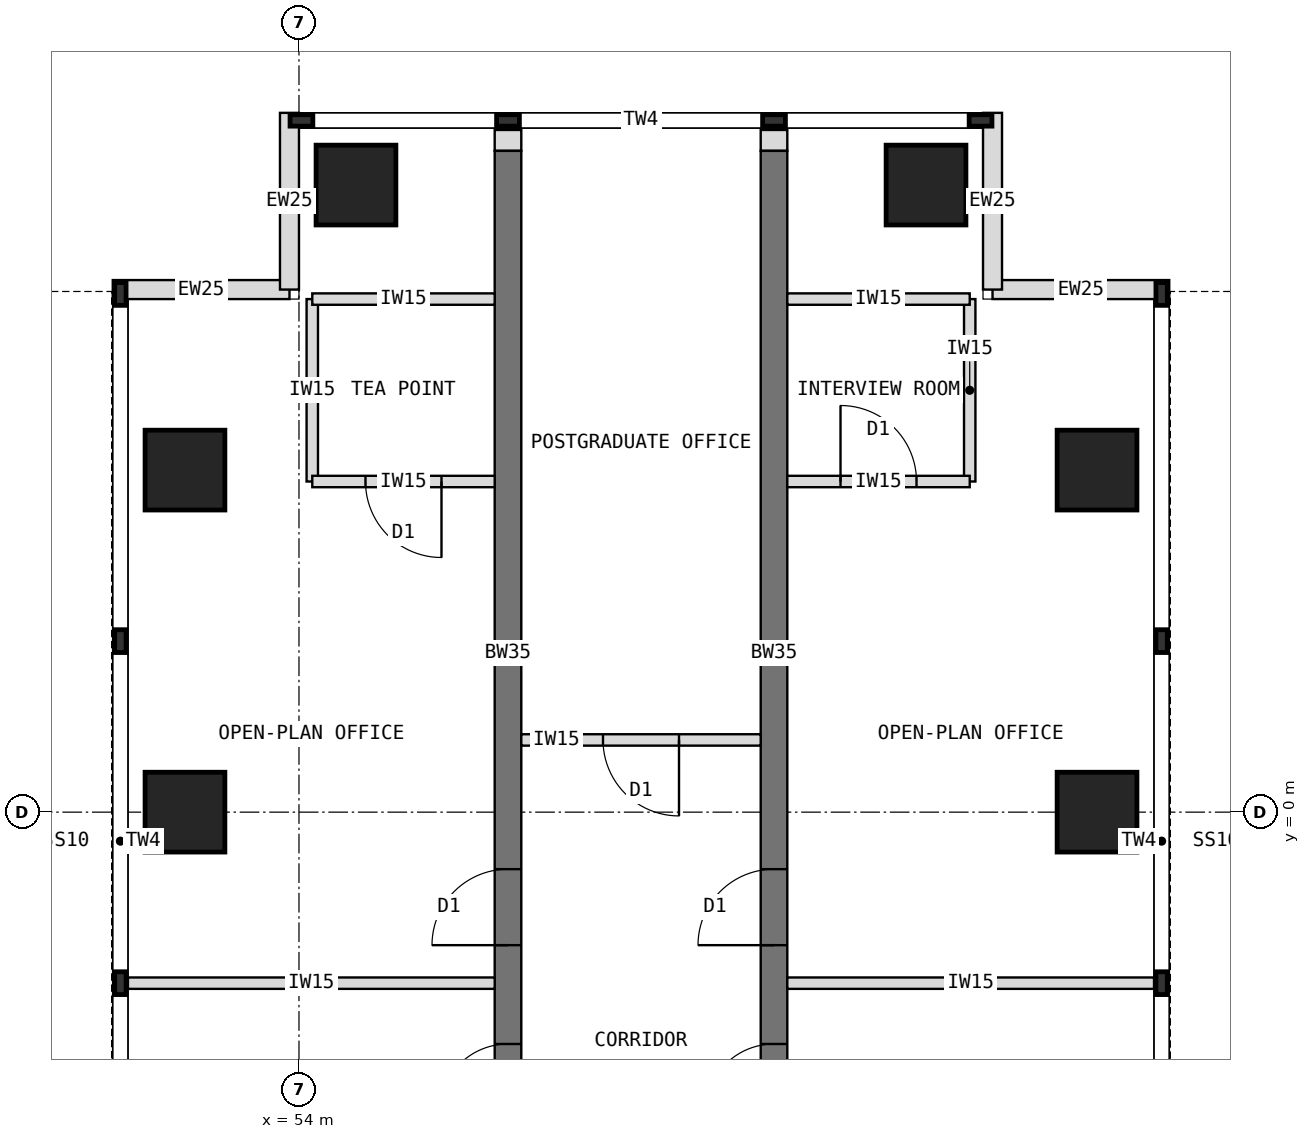
"""IFC4 building model, lengths in metres.
Left out: names, types, materials, properties, quantities, classifications, styles, units other than length and angle.
Written with IfcOpenShell. Run it as: python <this file> out.ifc"""

import sys

from ifc_helpers import new_model, si_unit, direction, frame, frame_2d, origin, origin_2d, place, context, subcontext, project, spatial, rectangle, extrude, element, fill, save


model = new_model("IFC4")
c1 = context("Model", 3, precision=1e-05, world=origin(), true_north=direction((0.0, 1.0)))
c2 = subcontext(c1, "Body", "Model", "MODEL_VIEW")
j1 = project(units=[si_unit("LENGTHUNIT", "METRE"), si_unit("PLANEANGLEUNIT", "RADIAN")], contexts=[c1])
p1 = place(None, origin())
s1 = spatial("IfcSite", under=j1, at=p1, CompositionType="ELEMENT")
p2 = place(p1, origin())
s2 = spatial("IfcBuilding", under=s1, at=p2, CompositionType="ELEMENT")
p3 = place(p2, frame((0.0, 0.0, 247.5)))
s3 = spatial("IfcBuildingStorey", under=s2, at=p3, CompositionType="ELEMENT", Elevation=247.5)
p4 = place(p3, frame((56.75, -4.5, 0.0), z_axis=(0.0, 0.0, 1.0), x_axis=(0.0, 1.0, 0.0)))
e1 = element("IfcWall", 1, at=p4, inside=s3, PredefinedType="SHEAR", context=c2, shape_type="SweptSolid", body=[
    extrude(rectangle(XDim=13.2, YDim=0.35, at=frame_2d((6.6, 0.0))), origin(), (0.0, 0.0, 1.0), 4.0),
])
p5 = place(p4, frame((0.55, 0.0, 0.0)))
e2 = element("IfcOpeningElement", 2, at=p5, cuts=e1, PredefinedType="OPENING", context=c2, shape_type="SweptSolid", body=[
    extrude(rectangle(XDim=0.9, YDim=2.1, at=frame_2d((0.45, 1.05))), frame((0.0, 0.185, 0.0), z_axis=(0.0, -1.0, 0.0), x_axis=(1.0, 0.0, 0.0)), (0.0, 0.0, 1.0), 0.37),
])
p6 = place(p4, frame((2.75, 0.0, 0.0)))
e3 = element("IfcOpeningElement", 3, at=p6, cuts=e1, PredefinedType="OPENING", context=c2, shape_type="SweptSolid", body=[
    extrude(rectangle(XDim=1.0, YDim=2.1, at=frame_2d((0.5, 1.05))), frame((0.0, 0.185, 0.0), z_axis=(0.0, -1.0, 0.0), x_axis=(1.0, 0.0, 0.0)), (0.0, 0.0, 1.0), 0.37),
])
p7 = place(p3, frame((60.25, -4.5, 0.0), z_axis=(0.0, 0.0, 1.0), x_axis=(0.0, 1.0, 0.0)))
e4 = element("IfcWall", 4, at=p7, inside=s3, PredefinedType="SHEAR", context=c2, shape_type="SweptSolid", body=[
    extrude(rectangle(XDim=13.2, YDim=0.35, at=frame_2d((6.6, 0.0))), origin(), (0.0, 0.0, 1.0), 4.0),
])
p8 = place(p7, frame((0.55, 0.0, 0.0)))
e5 = element("IfcOpeningElement", 5, at=p8, cuts=e4, PredefinedType="OPENING", context=c2, shape_type="SweptSolid", body=[
    extrude(rectangle(XDim=0.9, YDim=2.1, at=frame_2d((0.45, 1.05))), frame((0.0, 0.185, 0.0), z_axis=(0.0, -1.0, 0.0), x_axis=(1.0, 0.0, 0.0)), (0.0, 0.0, 1.0), 0.37),
])
p9 = place(p7, frame((2.75, 0.0, 0.0)))
e6 = element("IfcOpeningElement", 6, at=p9, cuts=e4, PredefinedType="OPENING", context=c2, shape_type="SweptSolid", body=[
    extrude(rectangle(XDim=1.0, YDim=2.1, at=frame_2d((0.5, 1.05))), frame((0.0, 0.185, 0.0), z_axis=(0.0, -1.0, 0.0), x_axis=(1.0, 0.0, 0.0)), (0.0, 0.0, 1.0), 0.37),
])
for number, where, z_axis, x_axis in (
    (7, (52.5, 0.0, 0.0), (0.0, 0.0, 1.0), (1.0, 0.0, 0.0)),
    (8, (64.5, 0.0, 0.0), (0.0, 0.0, 1.0), (1.0, 0.0, 0.0)),
    (9, (52.5, 4.5, 0.0), (0.0, 0.0, 1.0), (1.0, 0.0, 0.0)),
    (10, (64.5, 4.5, 0.0), (0.0, 0.0, 1.0), (1.0, 0.0, 0.0)),
    (11, (54.75, 8.25, 0.0), (0.0, 0.0, 1.0), (1.0, 0.0, 0.0)),
    (12, (62.25, 8.25, 0.0), (0.0, 0.0, 1.0), (1.0, 0.0, 0.0)),
):
    element("IfcColumn", number, at=place(p3, frame(where, z_axis=z_axis, x_axis=x_axis)), inside=s3, PredefinedType="COLUMN", context=c2, shape_type="SweptSolid", body=[
        extrude(rectangle(XDim=1.05, YDim=1.05, at=origin_2d()), origin(), (0.0, 0.0, 1.0), 4.0),
    ])
for number, where, z_axis, x_axis in (
    (13, (51.55, 6.875, 0.0), (0.0, 0.0, 1.0), (1.0, 0.0, 0.0)),
    (14, (53.875, 6.875, 0.0), (0.0, 0.0, 1.0), (0.0, 1.0, 0.0)),
    (15, (65.45, 6.875, 0.0), (0.0, 0.0, 1.0), (-1.0, 0.0, 0.0)),
    (16, (63.125, 6.875, 0.0), (0.0, 0.0, 1.0), (0.0, 1.0, 0.0)),
):
    element("IfcWall", number, at=place(p3, frame(where, z_axis=z_axis, x_axis=x_axis)), inside=s3, PredefinedType="STANDARD", context=c2, shape_type="SweptSolid", body=[
        extrude(rectangle(XDim=2.325, YDim=0.25, at=frame_2d((1.163, 0.0))), origin(), (0.0, 0.0, 1.0), 3.8),
    ])
for number, where, z_axis, x_axis in (
    (17, (56.75, 8.7, 0.0), (0.0, 0.0, 1.0), (0.0, 1.0, 0.0)),
    (18, (60.25, 8.7, 0.0), (0.0, 0.0, 1.0), (0.0, 1.0, 0.0)),
):
    element("IfcWall", number, at=place(p3, frame(where, z_axis=z_axis, x_axis=x_axis)), inside=s3, PredefinedType="PARTITIONING", context=c2, shape_type="SweptSolid", body=[
        extrude(rectangle(XDim=0.275, YDim=0.35, at=frame_2d((0.138, 0.0))), origin(), (0.0, 0.0, 1.0), 3.8),
    ])
p10 = place(p3, frame((56.575, -2.25, 0.0), z_axis=(0.0, 0.0, 1.0), x_axis=(-1.0, 0.0, 0.0)))
e19 = element("IfcWall", 19, at=p10, inside=s3, PredefinedType="PARTITIONING", context=c2, shape_type="SweptSolid", body=[
    extrude(rectangle(XDim=4.825, YDim=0.15, at=frame_2d((2.413, 0.0))), origin(), (0.0, 0.0, 1.0), 3.8),
])
p11 = place(p3, frame((54.175, 4.35, 0.0), z_axis=(0.0, 0.0, 1.0), x_axis=(0.0, 1.0, 0.0)))
e20 = element("IfcWall", 20, at=p11, inside=s3, PredefinedType="PARTITIONING", context=c2, shape_type="SweptSolid", body=[
    extrude(rectangle(XDim=2.4, YDim=0.15, at=frame_2d((1.2, 0.0))), origin(), (0.0, 0.0, 1.0), 3.8),
])
p12 = place(p3, frame((56.575, 4.35, 0.0), z_axis=(0.0, 0.0, 1.0), x_axis=(-1.0, 0.0, 0.0)))
e21 = element("IfcWall", 21, at=p12, inside=s3, PredefinedType="PARTITIONING", context=c2, shape_type="SweptSolid", body=[
    extrude(rectangle(XDim=2.4, YDim=0.15, at=frame_2d((1.2, 0.0))), origin(), (0.0, 0.0, 1.0), 3.8),
])
p13 = place(p12, frame((0.7, 0.0, 0.0)))
e22 = element("IfcOpeningElement", 22, at=p13, cuts=e21, PredefinedType="OPENING", context=c2, shape_type="SweptSolid", body=[
    extrude(rectangle(XDim=1.0, YDim=2.1, at=frame_2d((0.5, 1.05))), frame((0.0, 0.085, 0.0), z_axis=(0.0, -1.0, 0.0), x_axis=(1.0, 0.0, 0.0)), (0.0, 0.0, 1.0), 0.17),
])
p14 = place(p3, frame((56.575, 6.75, 0.0), z_axis=(0.0, 0.0, 1.0), x_axis=(-1.0, 0.0, 0.0)))
e23 = element("IfcWall", 23, at=p14, inside=s3, PredefinedType="PARTITIONING", context=c2, shape_type="SweptSolid", body=[
    extrude(rectangle(XDim=2.4, YDim=0.15, at=frame_2d((1.2, 0.0))), origin(), (0.0, 0.0, 1.0), 3.8),
])
p15 = place(p3, frame((60.425, -2.25, 0.0), z_axis=(0.0, 0.0, 1.0), x_axis=(1.0, 0.0, 0.0)))
e24 = element("IfcWall", 24, at=p15, inside=s3, PredefinedType="PARTITIONING", context=c2, shape_type="SweptSolid", body=[
    extrude(rectangle(XDim=4.825, YDim=0.15, at=frame_2d((2.413, 0.0))), origin(), (0.0, 0.0, 1.0), 3.8),
])
p16 = place(p3, frame((62.825, 4.35, 0.0), z_axis=(0.0, 0.0, 1.0), x_axis=(0.0, 1.0, 0.0)))
e25 = element("IfcWall", 25, at=p16, inside=s3, PredefinedType="PARTITIONING", context=c2, shape_type="SweptSolid", body=[
    extrude(rectangle(XDim=2.4, YDim=0.15, at=frame_2d((1.2, 0.0))), origin(), (0.0, 0.0, 1.0), 3.8),
])
p17 = place(p3, frame((60.425, 4.35, 0.0), z_axis=(0.0, 0.0, 1.0), x_axis=(1.0, 0.0, 0.0)))
e26 = element("IfcWall", 26, at=p17, inside=s3, PredefinedType="PARTITIONING", context=c2, shape_type="SweptSolid", body=[
    extrude(rectangle(XDim=2.4, YDim=0.15, at=frame_2d((1.2, 0.0))), origin(), (0.0, 0.0, 1.0), 3.8),
])
p18 = place(p17, frame((0.7, 0.0, 0.0)))
e27 = element("IfcOpeningElement", 27, at=p18, cuts=e26, PredefinedType="OPENING", context=c2, shape_type="SweptSolid", body=[
    extrude(rectangle(XDim=1.0, YDim=2.1, at=frame_2d((0.5, 1.05))), frame((0.0, 0.085, 0.0), z_axis=(0.0, -1.0, 0.0), x_axis=(1.0, 0.0, 0.0)), (0.0, 0.0, 1.0), 0.17),
])
p19 = place(p3, frame((60.425, 6.75, 0.0), z_axis=(0.0, 0.0, 1.0), x_axis=(1.0, 0.0, 0.0)))
e28 = element("IfcWall", 28, at=p19, inside=s3, PredefinedType="PARTITIONING", context=c2, shape_type="SweptSolid", body=[
    extrude(rectangle(XDim=2.4, YDim=0.15, at=frame_2d((1.2, 0.0))), origin(), (0.0, 0.0, 1.0), 3.8),
])
p20 = place(p3, frame((60.075, 0.95, 0.0), z_axis=(0.0, 0.0, 1.0), x_axis=(-1.0, 0.0, 0.0)))
e29 = element("IfcWall", 29, at=p20, inside=s3, PredefinedType="PARTITIONING", context=c2, shape_type="SweptSolid", body=[
    extrude(rectangle(XDim=3.15, YDim=0.15, at=frame_2d((1.575, 0.0))), origin(), (0.0, 0.0, 1.0), 3.8),
])
p21 = place(p20, frame((1.075, 0.0, 0.0)))
e30 = element("IfcOpeningElement", 30, at=p21, cuts=e29, PredefinedType="OPENING", context=c2, shape_type="SweptSolid", body=[
    extrude(rectangle(XDim=1.0, YDim=2.1, at=frame_2d((0.5, 1.05))), frame((0.0, 0.085, 0.0), z_axis=(0.0, -1.0, 0.0), x_axis=(1.0, 0.0, 0.0)), (0.0, 0.0, 1.0), 0.17),
])
p22 = place(p13, origin())
e31 = element("IfcDoor", 31, at=p22, inside=s3, OperationType="SINGLE_SWING_LEFT", PredefinedType="DOOR", context=c2, shape_type="SweptSolid", body=[
    extrude(rectangle(XDim=1.0, YDim=2.1, at=frame_2d((0.5, 1.05))), frame((0.0, 0.025, 0.0), z_axis=(0.0, -1.0, 0.0), x_axis=(1.0, 0.0, 0.0)), (0.0, 0.0, 1.0), 0.05),
])
fill(e22, e31)
p23 = place(p18, origin())
e32 = element("IfcDoor", 32, at=p23, inside=s3, OperationType="SINGLE_SWING_LEFT", PredefinedType="DOOR", context=c2, shape_type="SweptSolid", body=[
    extrude(rectangle(XDim=1.0, YDim=2.1, at=frame_2d((0.5, 1.05))), frame((0.0, 0.025, 0.0), z_axis=(0.0, -1.0, 0.0), x_axis=(1.0, 0.0, 0.0)), (0.0, 0.0, 1.0), 0.05),
])
fill(e27, e32)
p24 = place(p21, origin())
e33 = element("IfcDoor", 33, at=p24, inside=s3, OperationType="SINGLE_SWING_LEFT", PredefinedType="DOOR", context=c2, shape_type="SweptSolid", body=[
    extrude(rectangle(XDim=1.0, YDim=2.1, at=frame_2d((0.5, 1.05))), frame((0.0, 0.025, 0.0), z_axis=(0.0, -1.0, 0.0), x_axis=(1.0, 0.0, 0.0)), (0.0, 0.0, 1.0), 0.05),
])
fill(e30, e33)
p25 = place(p5, origin())
e34 = element("IfcDoor", 34, at=p25, inside=s3, OperationType="SINGLE_SWING_LEFT", PredefinedType="DOOR", context=c2, shape_type="SweptSolid", body=[
    extrude(rectangle(XDim=0.9, YDim=2.1, at=frame_2d((0.45, 1.05))), frame((0.0, 0.025, 0.0), z_axis=(0.0, -1.0, 0.0), x_axis=(1.0, 0.0, 0.0)), (0.0, 0.0, 1.0), 0.05),
])
fill(e2, e34)
p26 = place(p6, origin())
e35 = element("IfcDoor", 35, at=p26, inside=s3, OperationType="SINGLE_SWING_LEFT", PredefinedType="DOOR", context=c2, shape_type="SweptSolid", body=[
    extrude(rectangle(XDim=1.0, YDim=2.1, at=frame_2d((0.5, 1.05))), frame((0.0, 0.025, 0.0), z_axis=(0.0, -1.0, 0.0), x_axis=(1.0, 0.0, 0.0)), (0.0, 0.0, 1.0), 0.05),
])
fill(e3, e35)
p27 = place(p8, origin())
e36 = element("IfcDoor", 36, at=p27, inside=s3, OperationType="SINGLE_SWING_LEFT", PredefinedType="DOOR", context=c2, shape_type="SweptSolid", body=[
    extrude(rectangle(XDim=0.9, YDim=2.1, at=frame_2d((0.45, 1.05))), frame((0.0, 0.025, 0.0), z_axis=(0.0, -1.0, 0.0), x_axis=(1.0, 0.0, 0.0)), (0.0, 0.0, 1.0), 0.05),
])
fill(e5, e36)
p28 = place(p9, origin())
e37 = element("IfcDoor", 37, at=p28, inside=s3, OperationType="SINGLE_SWING_LEFT", PredefinedType="DOOR", context=c2, shape_type="SweptSolid", body=[
    extrude(rectangle(XDim=1.0, YDim=2.1, at=frame_2d((0.5, 1.05))), frame((0.0, 0.025, 0.0), z_axis=(0.0, -1.0, 0.0), x_axis=(1.0, 0.0, 0.0)), (0.0, 0.0, 1.0), 0.05),
])
fill(e6, e37)
save(model, sys.argv[1])
